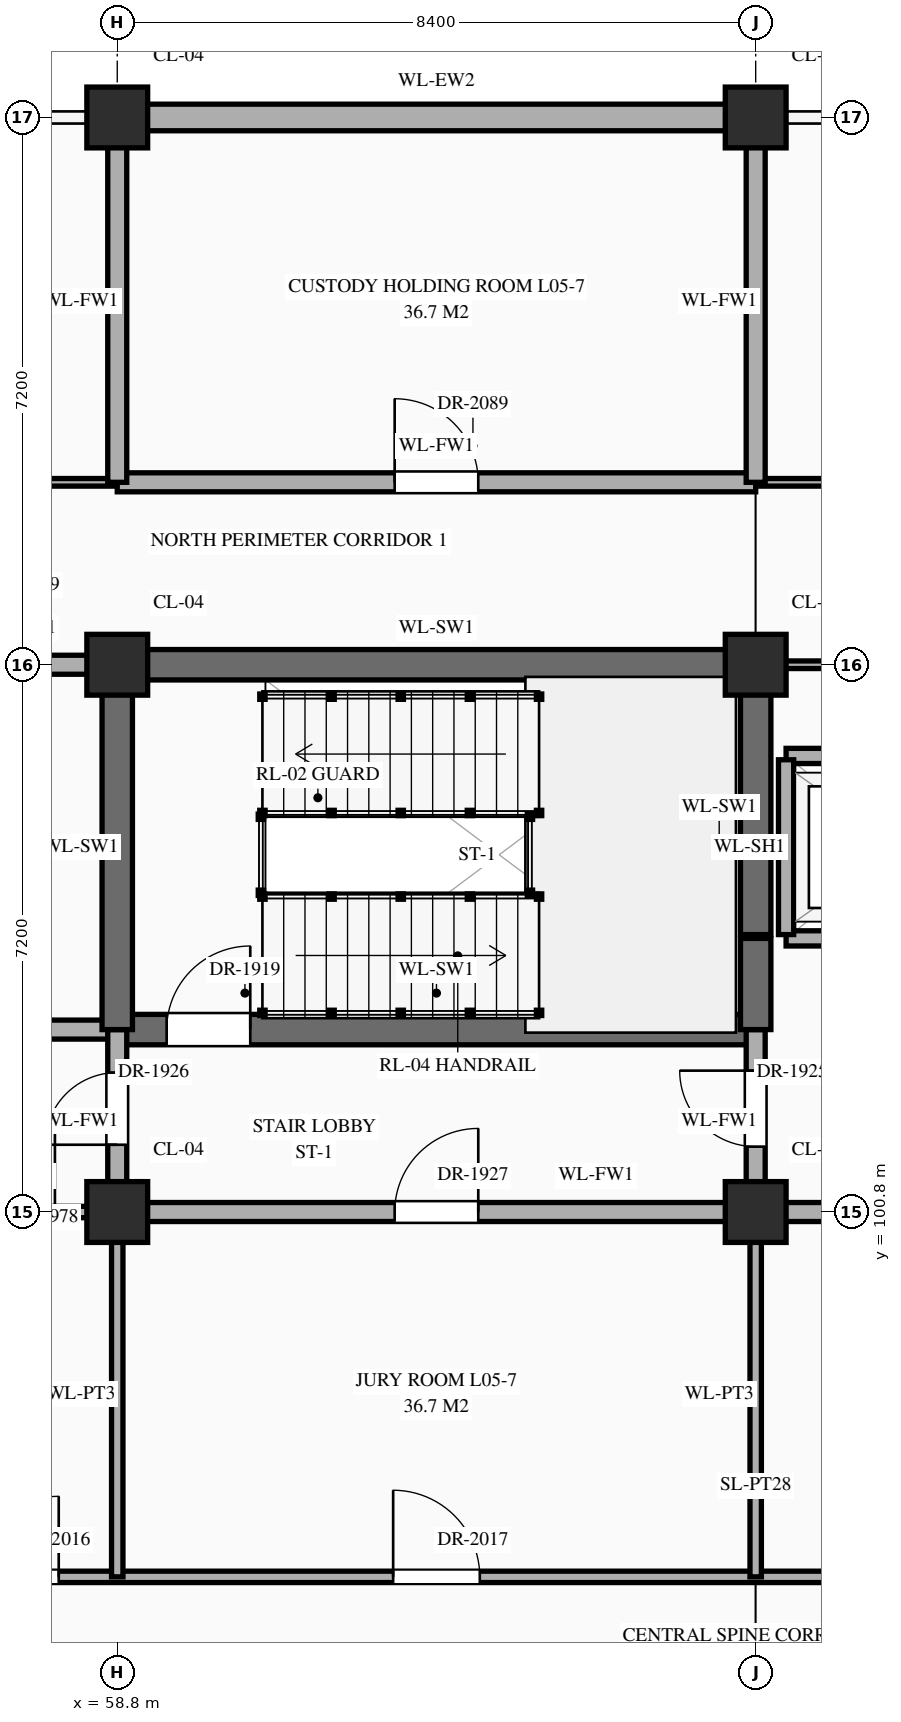
"""IFC4 building model, lengths in metres.
Left out: names, types, materials, properties, quantities, classifications, styles, units other than length and angle.
Written with IfcOpenShell. Run it as: python <this file> out.ifc"""

import sys

from ifc_helpers import new_model, si_unit, direction, frame, frame_2d, origin, origin_2d, place, context, subcontext, project, spatial, rectangle, extrude, element, fill, save


model = new_model("IFC4")
c1 = context("Model", 3, precision=1e-05, world=origin(), true_north=direction((0.0, 1.0)))
c2 = subcontext(c1, "Body", "Model", "MODEL_VIEW")
j1 = project(units=[si_unit("LENGTHUNIT", "METRE"), si_unit("PLANEANGLEUNIT", "RADIAN")], contexts=[c1])
p1 = place(None, origin())
s1 = spatial("IfcSite", under=j1, at=p1, CompositionType="ELEMENT")
p2 = place(p1, origin())
s2 = spatial("IfcBuilding", under=s1, at=p2, CompositionType="ELEMENT")
p3 = place(p2, frame((0.0, 0.0, 21.6)))
s3 = spatial("IfcBuildingStorey", under=s2, at=p3, CompositionType="ELEMENT", Elevation=21.6)
for number, where, z_axis, x_axis in (
    (1, (58.8, 100.8, 0.0), (0.0, 0.0, 1.0), (1.0, 0.0, 0.0)),
    (2, (58.8, 108.0, 0.0), (0.0, 0.0, 1.0), (1.0, 0.0, 0.0)),
    (3, (58.8, 115.2, 0.0), (0.0, 0.0, 1.0), (1.0, 0.0, 0.0)),
    (4, (67.2, 100.8, 0.0), (0.0, 0.0, 1.0), (1.0, 0.0, 0.0)),
    (5, (67.2, 108.0, 0.0), (0.0, 0.0, 1.0), (1.0, 0.0, 0.0)),
    (6, (67.2, 115.2, 0.0), (0.0, 0.0, 1.0), (1.0, 0.0, 0.0)),
):
    element("IfcColumn", number, at=place(p3, frame(where, z_axis=z_axis, x_axis=x_axis)), inside=s3, PredefinedType="COLUMN", context=c2, shape_type="SweptSolid", body=[
        extrude(rectangle(XDim=0.8, YDim=0.8, at=origin_2d()), origin(), (0.0, 0.0, 1.0), 4.5),
    ])
p4 = place(p3, frame((59.195, 115.2, 0.0), z_axis=(0.0, 0.0, 1.0), x_axis=(1.0, 0.0, 0.0)))
e7 = element("IfcWall", 7, at=p4, inside=s3, PredefinedType="STANDARD", context=c2, shape_type="SweptSolid", body=[
    extrude(rectangle(XDim=7.61, YDim=0.35, at=frame_2d((3.805, 0.0))), origin(), (0.0, 0.0, 1.0), 3.59),
])
p5 = place(p3, frame((56.2, 96.0, 0.0), z_axis=(0.0, 0.0, 1.0), x_axis=(1.0, 0.0, 0.0)))
e8 = element("IfcWall", 8, at=p5, inside=s3, PredefinedType="STANDARD", context=c2, shape_type="SweptSolid", body=[
    extrude(rectangle(XDim=27.8, YDim=0.15, at=frame_2d((13.9, 0.0))), origin(), (0.0, 0.0, 1.0), 4.24),
])
p6 = place(p5, frame((0.77, 0.0, 0.0)))
e9 = element("IfcOpeningElement", 9, at=p6, cuts=e8, PredefinedType="OPENING", context=c2, shape_type="SweptSolid", body=[
    extrude(rectangle(XDim=1.06, YDim=2.4, at=frame_2d((0.53, 1.2))), frame((0.0, 0.087, 0.0), z_axis=(0.0, -1.0, 0.0), x_axis=(1.0, 0.0, 0.0)), (0.0, 0.0, 1.0), 0.174),
])
p7 = place(p5, frame((6.23, 0.0, 0.0)))
e10 = element("IfcOpeningElement", 10, at=p7, cuts=e8, PredefinedType="OPENING", context=c2, shape_type="SweptSolid", body=[
    extrude(rectangle(XDim=1.14, YDim=2.4, at=frame_2d((0.57, 1.2))), frame((0.0, 0.087, 0.0), z_axis=(0.0, -1.0, 0.0), x_axis=(1.0, 0.0, 0.0)), (0.0, 0.0, 1.0), 0.174),
])
p8 = place(p5, frame((14.75, 0.0, 0.0)))
e11 = element("IfcOpeningElement", 11, at=p8, cuts=e8, PredefinedType="OPENING", context=c2, shape_type="SweptSolid", body=[
    extrude(rectangle(XDim=0.9, YDim=2.15, at=frame_2d((0.45, 1.075))), frame((0.0, 0.087, 0.0), z_axis=(0.0, -1.0, 0.0), x_axis=(1.0, 0.0, 0.0)), (0.0, 0.0, 1.0), 0.174),
])
p9 = place(p5, frame((23.17, 0.0, 0.0)))
e12 = element("IfcOpeningElement", 12, at=p9, cuts=e8, PredefinedType="OPENING", context=c2, shape_type="SweptSolid", body=[
    extrude(rectangle(XDim=0.86, YDim=2.1, at=frame_2d((0.43, 1.05))), frame((0.0, 0.087, 0.0), z_axis=(0.0, -1.0, 0.0), x_axis=(1.0, 0.0, 0.0)), (0.0, 0.0, 1.0), 0.174),
])
p10 = place(p3, frame((56.2, 100.8, 0.0), z_axis=(0.0, 0.0, 1.0), x_axis=(1.0, 0.0, 0.0)))
e13 = element("IfcWall", 13, at=p10, inside=s3, PredefinedType="STANDARD", context=c2, shape_type="SweptSolid", body=[
    extrude(rectangle(XDim=2.6, YDim=0.15, at=frame_2d((1.3, 0.0))), origin(), (0.0, 0.0, 1.0), 3.39),
])
p11 = place(p10, frame((0.5, 0.0, 0.0)))
e14 = element("IfcOpeningElement", 14, at=p11, cuts=e13, PredefinedType="OPENING", context=c2, shape_type="SweptSolid", body=[
    extrude(rectangle(XDim=1.28, YDim=2.35, at=frame_2d((0.64, 1.175))), frame((0.0, 0.087, 0.0), z_axis=(0.0, -1.0, 0.0), x_axis=(1.0, 0.0, 0.0)), (0.0, 0.0, 1.0), 0.174),
])
p12 = place(p3, frame((58.8, 100.8, 0.0), z_axis=(0.0, 0.0, 1.0), x_axis=(1.0, 0.0, 0.0)))
e15 = element("IfcWall", 15, at=p12, inside=s3, PredefinedType="STANDARD", context=c2, shape_type="SweptSolid", body=[
    extrude(rectangle(XDim=12.6, YDim=0.25, at=frame_2d((6.3, 0.0))), origin(), (0.0, 0.0, 1.0), 3.39),
])
p13 = place(p12, frame((3.65, 0.0, 0.0)))
e16 = element("IfcOpeningElement", 16, at=p13, cuts=e15, PredefinedType="OPENING", context=c2, shape_type="SweptSolid", body=[
    extrude(rectangle(XDim=1.1, YDim=2.2, at=frame_2d((0.55, 1.1))), frame((0.0, 0.137, 0.0), z_axis=(0.0, -1.0, 0.0), x_axis=(1.0, 0.0, 0.0)), (0.0, 0.0, 1.0), 0.274),
])
p14 = place(p3, frame((54.6, 103.2, 0.0), z_axis=(0.0, 0.0, 1.0), x_axis=(1.0, 0.0, 0.0)))
e17 = element("IfcWall", 17, at=p14, inside=s3, PredefinedType="STANDARD", context=c2, shape_type="SweptSolid", body=[
    extrude(rectangle(XDim=4.2, YDim=0.25, at=frame_2d((2.1, 0.0))), origin(), (0.0, 0.0, 1.0), 4.24),
])
p15 = place(p14, frame((1.6, 0.0, 0.0)))
e18 = element("IfcOpeningElement", 18, at=p15, cuts=e17, PredefinedType="OPENING", context=c2, shape_type="SweptSolid", body=[
    extrude(rectangle(XDim=1.0, YDim=2.2, at=frame_2d((0.5, 1.1))), frame((0.0, 0.137, 0.0), z_axis=(0.0, -1.0, 0.0), x_axis=(1.0, 0.0, 0.0)), (0.0, 0.0, 1.0), 0.274),
])
p16 = place(p3, frame((58.8, 103.2, 0.0), z_axis=(0.0, 0.0, 1.0), x_axis=(1.0, 0.0, 0.0)))
e19 = element("IfcWall", 19, at=p16, inside=s3, PredefinedType="SHEAR", context=c2, shape_type="SweptSolid", body=[
    extrude(rectangle(XDim=8.4, YDim=0.4, at=frame_2d((4.2, 0.0))), origin(), (0.0, 0.0, 1.0), 4.24),
])
p17 = place(p16, frame((0.65, 0.0, 0.0)))
e20 = element("IfcOpeningElement", 20, at=p17, cuts=e19, PredefinedType="OPENING", context=c2, shape_type="SweptSolid", body=[
    extrude(rectangle(XDim=1.1, YDim=2.2, at=frame_2d((0.55, 1.1))), frame((0.0, 0.212, 0.0), z_axis=(0.0, -1.0, 0.0), x_axis=(1.0, 0.0, 0.0)), (0.0, 0.0, 1.0), 0.424),
])
p18 = place(p3, frame((67.6, 104.4, 0.0), z_axis=(0.0, 0.0, 1.0), x_axis=(1.0, 0.0, 0.0)))
e21 = element("IfcWall", 21, at=p18, inside=s3, PredefinedType="STANDARD", context=c2, shape_type="SweptSolid", body=[
    extrude(rectangle(XDim=3.0, YDim=0.2, at=frame_2d((1.5, 0.0))), origin(), (0.0, 0.0, 1.0), 4.24),
])
p19 = place(p18, frame((0.9, 0.0, 0.0)))
e22 = element("IfcOpeningElement", 22, at=p19, cuts=e21, PredefinedType="OPENING", context=c2, shape_type="SweptSolid", body=[
    extrude(rectangle(XDim=1.2, YDim=2.15, at=frame_2d((0.6, 1.075))), frame((0.0, 0.112, 0.0), z_axis=(0.0, -1.0, 0.0), x_axis=(1.0, 0.0, 0.0)), (0.0, 0.0, 1.0), 0.224),
])
p20 = place(p3, frame((67.6, 106.8, 0.0), z_axis=(0.0, 0.0, 1.0), x_axis=(1.0, 0.0, 0.0)))
e23 = element("IfcWall", 23, at=p20, inside=s3, PredefinedType="STANDARD", context=c2, shape_type="SweptSolid", body=[
    extrude(rectangle(XDim=3.0, YDim=0.2, at=frame_2d((1.5, 0.0))), origin(), (0.0, 0.0, 1.0), 4.24),
])
p21 = place(p3, frame((54.6, 108.0, 0.0), z_axis=(0.0, 0.0, 1.0), x_axis=(1.0, 0.0, 0.0)))
e24 = element("IfcWall", 24, at=p21, inside=s3, PredefinedType="STANDARD", context=c2, shape_type="SweptSolid", body=[
    extrude(rectangle(XDim=4.2, YDim=0.25, at=frame_2d((2.1, 0.0))), origin(), (0.0, 0.0, 1.0), 3.39),
])
p22 = place(p21, frame((1.44, 0.0, 0.0)))
e25 = element("IfcOpeningElement", 25, at=p22, cuts=e24, PredefinedType="OPENING", context=c2, shape_type="SweptSolid", body=[
    extrude(rectangle(XDim=1.0, YDim=2.2, at=frame_2d((0.5, 1.1))), frame((0.0, 0.137, 0.0), z_axis=(0.0, -1.0, 0.0), x_axis=(1.0, 0.0, 0.0)), (0.0, 0.0, 1.0), 0.274),
])
p23 = place(p3, frame((58.8, 108.0, 0.0), z_axis=(0.0, 0.0, 1.0), x_axis=(1.0, 0.0, 0.0)))
e26 = element("IfcWall", 26, at=p23, inside=s3, PredefinedType="SHEAR", context=c2, shape_type="SweptSolid", body=[
    extrude(rectangle(XDim=8.4, YDim=0.4, at=frame_2d((4.2, 0.0))), origin(), (0.0, 0.0, 1.0), 4.24),
])
p24 = place(p3, frame((67.25, 108.0, 0.0), z_axis=(0.0, 0.0, 1.0), x_axis=(1.0, 0.0, 0.0)))
e27 = element("IfcWall", 27, at=p24, inside=s3, PredefinedType="STANDARD", context=c2, shape_type="SweptSolid", body=[
    extrude(rectangle(XDim=4.1, YDim=0.1, at=frame_2d((2.05, 0.0))), origin(), (0.0, 0.0, 1.0), 3.39),
])
p25 = place(p3, frame((50.44, 110.4, 0.0), z_axis=(0.0, 0.0, 1.0), x_axis=(1.0, 0.0, 0.0)))
e28 = element("IfcWall", 28, at=p25, inside=s3, PredefinedType="STANDARD", context=c2, shape_type="SweptSolid", body=[
    extrude(rectangle(XDim=8.36, YDim=0.1, at=frame_2d((4.18, 0.0))), origin(), (0.0, 0.0, 1.0), 4.24),
])
p26 = place(p25, frame((3.72, 0.0, 0.0)))
e29 = element("IfcOpeningElement", 29, at=p26, cuts=e28, PredefinedType="OPENING", context=c2, shape_type="SweptSolid", body=[
    extrude(rectangle(XDim=0.92, YDim=2.15, at=frame_2d((0.46, 1.075))), frame((0.0, 0.062, 0.0), z_axis=(0.0, -1.0, 0.0), x_axis=(1.0, 0.0, 0.0)), (0.0, 0.0, 1.0), 0.124),
])
p27 = place(p3, frame((58.8, 110.4, 0.0), z_axis=(0.0, 0.0, 1.0), x_axis=(1.0, 0.0, 0.0)))
e30 = element("IfcWall", 30, at=p27, inside=s3, PredefinedType="STANDARD", context=c2, shape_type="SweptSolid", body=[
    extrude(rectangle(XDim=8.4, YDim=0.25, at=frame_2d((4.2, 0.0))), origin(), (0.0, 0.0, 1.0), 4.24),
])
p28 = place(p27, frame((3.65, 0.0, 0.0)))
e31 = element("IfcOpeningElement", 31, at=p28, cuts=e30, PredefinedType="OPENING", context=c2, shape_type="SweptSolid", body=[
    extrude(rectangle(XDim=1.1, YDim=2.2, at=frame_2d((0.55, 1.1))), frame((0.0, 0.137, 0.0), z_axis=(0.0, -1.0, 0.0), x_axis=(1.0, 0.0, 0.0)), (0.0, 0.0, 1.0), 0.274),
])
p29 = place(p3, frame((67.2, 110.4, 0.0), z_axis=(0.0, 0.0, 1.0), x_axis=(1.0, 0.0, 0.0)))
e32 = element("IfcWall", 32, at=p29, inside=s3, PredefinedType="STANDARD", context=c2, shape_type="SweptSolid", body=[
    extrude(rectangle(XDim=33.6, YDim=0.1, at=frame_2d((16.8, 0.0))), origin(), (0.0, 0.0, 1.0), 4.24),
])
p30 = place(p29, frame((3.7, 0.0, 0.0)))
e33 = element("IfcOpeningElement", 33, at=p30, cuts=e32, PredefinedType="OPENING", context=c2, shape_type="SweptSolid", body=[
    extrude(rectangle(XDim=1.0, YDim=2.25, at=frame_2d((0.5, 1.125))), frame((0.0, 0.062, 0.0), z_axis=(0.0, -1.0, 0.0), x_axis=(1.0, 0.0, 0.0)), (0.0, 0.0, 1.0), 0.124),
])
p31 = place(p29, frame((12.08, 0.0, 0.0)))
e34 = element("IfcOpeningElement", 34, at=p31, cuts=e32, PredefinedType="OPENING", context=c2, shape_type="SweptSolid", body=[
    extrude(rectangle(XDim=1.04, YDim=2.2, at=frame_2d((0.52, 1.1))), frame((0.0, 0.062, 0.0), z_axis=(0.0, -1.0, 0.0), x_axis=(1.0, 0.0, 0.0)), (0.0, 0.0, 1.0), 0.124),
])
p32 = place(p29, frame((20.46, 0.0, 0.0)))
e35 = element("IfcOpeningElement", 35, at=p32, cuts=e32, PredefinedType="OPENING", context=c2, shape_type="SweptSolid", body=[
    extrude(rectangle(XDim=1.08, YDim=2.25, at=frame_2d((0.54, 1.125))), frame((0.0, 0.062, 0.0), z_axis=(0.0, -1.0, 0.0), x_axis=(1.0, 0.0, 0.0)), (0.0, 0.0, 1.0), 0.124),
])
p33 = place(p29, frame((28.84, 0.0, 0.0)))
e36 = element("IfcOpeningElement", 36, at=p33, cuts=e32, PredefinedType="OPENING", context=c2, shape_type="SweptSolid", body=[
    extrude(rectangle(XDim=1.12, YDim=2.25, at=frame_2d((0.56, 1.125))), frame((0.0, 0.062, 0.0), z_axis=(0.0, -1.0, 0.0), x_axis=(1.0, 0.0, 0.0)), (0.0, 0.0, 1.0), 0.124),
])
p34 = place(p3, frame((58.8, 96.0, 0.0), z_axis=(0.0, 0.0, 1.0), x_axis=(0.0, 1.0, 0.0)))
e37 = element("IfcWall", 37, at=p34, inside=s3, PredefinedType="STANDARD", context=c2, shape_type="SweptSolid", body=[
    extrude(rectangle(XDim=4.8, YDim=0.15, at=frame_2d((2.4, 0.0))), origin(), (0.0, 0.0, 1.0), 3.49),
])
p35 = place(p3, frame((58.8, 100.8, 0.0), z_axis=(0.0, 0.0, 1.0), x_axis=(0.0, 1.0, 0.0)))
e38 = element("IfcWall", 38, at=p35, inside=s3, PredefinedType="STANDARD", context=c2, shape_type="SweptSolid", body=[
    extrude(rectangle(XDim=2.4, YDim=0.25, at=frame_2d((1.2, 0.0))), origin(), (0.0, 0.0, 1.0), 3.49),
])
p36 = place(p35, frame((0.885, 0.0, 0.0)))
e39 = element("IfcOpeningElement", 39, at=p36, cuts=e38, PredefinedType="OPENING", context=c2, shape_type="SweptSolid", body=[
    extrude(rectangle(XDim=0.95, YDim=2.15, at=frame_2d((0.475, 1.075))), frame((0.0, 0.137, 0.0), z_axis=(0.0, -1.0, 0.0), x_axis=(1.0, 0.0, 0.0)), (0.0, 0.0, 1.0), 0.274),
])
p37 = place(p3, frame((58.8, 103.2, 0.0), z_axis=(0.0, 0.0, 1.0), x_axis=(0.0, 1.0, 0.0)))
e40 = element("IfcWall", 40, at=p37, inside=s3, PredefinedType="SHEAR", context=c2, shape_type="SweptSolid", body=[
    extrude(rectangle(XDim=4.8, YDim=0.4, at=frame_2d((2.4, 0.0))), origin(), (0.0, 0.0, 1.0), 4.24),
])
p38 = place(p3, frame((58.8, 110.4, 0.0), z_axis=(0.0, 0.0, 1.0), x_axis=(0.0, 1.0, 0.0)))
e41 = element("IfcWall", 41, at=p38, inside=s3, PredefinedType="STANDARD", context=c2, shape_type="SweptSolid", body=[
    extrude(rectangle(XDim=4.76, YDim=0.25, at=frame_2d((2.38, 0.0))), origin(), (0.0, 0.0, 1.0), 3.49),
])
p39 = place(p3, frame((67.2, 96.0, 0.0), z_axis=(0.0, 0.0, 1.0), x_axis=(0.0, 1.0, 0.0)))
e42 = element("IfcWall", 42, at=p39, inside=s3, PredefinedType="STANDARD", context=c2, shape_type="SweptSolid", body=[
    extrude(rectangle(XDim=4.8, YDim=0.15, at=frame_2d((2.4, 0.0))), origin(), (0.0, 0.0, 1.0), 3.49),
])
p40 = place(p3, frame((67.2, 100.8, 0.0), z_axis=(0.0, 0.0, 1.0), x_axis=(0.0, 1.0, 0.0)))
e43 = element("IfcWall", 43, at=p40, inside=s3, PredefinedType="STANDARD", context=c2, shape_type="SweptSolid", body=[
    extrude(rectangle(XDim=2.4, YDim=0.25, at=frame_2d((1.2, 0.0))), origin(), (0.0, 0.0, 1.0), 3.49),
])
p41 = place(p40, frame((0.86, 0.0, 0.0)))
e44 = element("IfcOpeningElement", 44, at=p41, cuts=e43, PredefinedType="OPENING", context=c2, shape_type="SweptSolid", body=[
    extrude(rectangle(XDim=1.0, YDim=2.2, at=frame_2d((0.5, 1.1))), frame((0.0, 0.137, 0.0), z_axis=(0.0, -1.0, 0.0), x_axis=(1.0, 0.0, 0.0)), (0.0, 0.0, 1.0), 0.274),
])
p42 = place(p3, frame((67.2, 103.2, 0.0), z_axis=(0.0, 0.0, 1.0), x_axis=(0.0, 1.0, 0.0)))
e45 = element("IfcWall", 45, at=p42, inside=s3, PredefinedType="SHEAR", context=c2, shape_type="SweptSolid", body=[
    extrude(rectangle(XDim=1.2, YDim=0.4, at=frame_2d((0.6, 0.0))), origin(), (0.0, 0.0, 1.0), 4.24),
])
p43 = place(p3, frame((67.2, 104.45, 0.0), z_axis=(0.0, 0.0, 1.0), x_axis=(0.0, 1.0, 0.0)))
e46 = element("IfcWall", 46, at=p43, inside=s3, PredefinedType="SHEAR", context=c2, shape_type="SweptSolid", body=[
    extrude(rectangle(XDim=3.5, YDim=0.4, at=frame_2d((1.75, 0.0))), origin(), (0.0, 0.0, 1.0), 4.24),
])
p44 = place(p3, frame((67.2, 110.4, 0.0), z_axis=(0.0, 0.0, 1.0), x_axis=(0.0, 1.0, 0.0)))
e47 = element("IfcWall", 47, at=p44, inside=s3, PredefinedType="STANDARD", context=c2, shape_type="SweptSolid", body=[
    extrude(rectangle(XDim=4.76, YDim=0.25, at=frame_2d((2.38, 0.0))), origin(), (0.0, 0.0, 1.0), 3.49),
])
p45 = place(p3, frame((67.6, 104.45, 0.0), z_axis=(0.0, 0.0, 1.0), x_axis=(0.0, 1.0, 0.0)))
e48 = element("IfcWall", 48, at=p45, inside=s3, PredefinedType="STANDARD", context=c2, shape_type="SweptSolid", body=[
    extrude(rectangle(XDim=2.3, YDim=0.2, at=frame_2d((1.15, 0.0))), origin(), (0.0, 0.0, 1.0), 4.24),
])
p46 = place(p17, origin())
e49 = element("IfcDoor", 49, at=p46, inside=s3, OperationType="SINGLE_SWING_RIGHT", PredefinedType="DOOR", context=c2, shape_type="SweptSolid", body=[
    extrude(rectangle(XDim=1.1, YDim=2.2, at=frame_2d((0.55, 1.1))), frame((0.0, 0.025, 0.0), z_axis=(0.0, -1.0, 0.0), x_axis=(1.0, 0.0, 0.0)), (0.0, 0.0, 1.0), 0.05),
])
fill(e20, e49)
p47 = place(p41, origin())
e50 = element("IfcDoor", 50, at=p47, inside=s3, OperationType="SINGLE_SWING_RIGHT", PredefinedType="DOOR", context=c2, shape_type="SweptSolid", body=[
    extrude(rectangle(XDim=1.0, YDim=2.2, at=frame_2d((0.5, 1.1))), frame((0.0, 0.025, 0.0), z_axis=(0.0, -1.0, 0.0), x_axis=(1.0, 0.0, 0.0)), (0.0, 0.0, 1.0), 0.05),
])
fill(e44, e50)
p48 = place(p36, origin())
e51 = element("IfcDoor", 51, at=p48, inside=s3, OperationType="SINGLE_SWING_LEFT", PredefinedType="DOOR", context=c2, shape_type="SweptSolid", body=[
    extrude(rectangle(XDim=0.95, YDim=2.15, at=frame_2d((0.475, 1.075))), frame((0.0, 0.025, 0.0), z_axis=(0.0, -1.0, 0.0), x_axis=(1.0, 0.0, 0.0)), (0.0, 0.0, 1.0), 0.05),
])
fill(e39, e51)
p49 = place(p13, origin())
e52 = element("IfcDoor", 52, at=p49, inside=s3, OperationType="SINGLE_SWING_RIGHT", PredefinedType="DOOR", context=c2, shape_type="SweptSolid", body=[
    extrude(rectangle(XDim=1.1, YDim=2.2, at=frame_2d((0.55, 1.1))), frame((0.0, 0.025, 0.0), z_axis=(0.0, -1.0, 0.0), x_axis=(1.0, 0.0, 0.0)), (0.0, 0.0, 1.0), 0.05),
])
fill(e16, e52)
p50 = place(p11, origin())
e53 = element("IfcDoor", 53, at=p50, inside=s3, OperationType="SINGLE_SWING_RIGHT", PredefinedType="DOOR", context=c2, shape_type="SweptSolid", body=[
    extrude(rectangle(XDim=1.28, YDim=2.35, at=frame_2d((0.64, 1.175))), frame((0.0, 0.025, 0.0), z_axis=(0.0, -1.0, 0.0), x_axis=(1.0, 0.0, 0.0)), (0.0, 0.0, 1.0), 0.05),
])
fill(e14, e53)
p51 = place(p6, origin())
e54 = element("IfcDoor", 54, at=p51, inside=s3, OperationType="SINGLE_SWING_RIGHT", PredefinedType="DOOR", context=c2, shape_type="SweptSolid", body=[
    extrude(rectangle(XDim=1.06, YDim=2.4, at=frame_2d((0.53, 1.2))), frame((0.0, 0.025, 0.0), z_axis=(0.0, -1.0, 0.0), x_axis=(1.0, 0.0, 0.0)), (0.0, 0.0, 1.0), 0.05),
])
fill(e9, e54)
p52 = place(p7, origin())
e55 = element("IfcDoor", 55, at=p52, inside=s3, OperationType="SINGLE_SWING_LEFT", PredefinedType="DOOR", context=c2, shape_type="SweptSolid", body=[
    extrude(rectangle(XDim=1.14, YDim=2.4, at=frame_2d((0.57, 1.2))), frame((0.0, 0.025, 0.0), z_axis=(0.0, -1.0, 0.0), x_axis=(1.0, 0.0, 0.0)), (0.0, 0.0, 1.0), 0.05),
])
fill(e10, e55)
p53 = place(p28, origin())
e56 = element("IfcDoor", 56, at=p53, inside=s3, OperationType="SINGLE_SWING_LEFT", PredefinedType="DOOR", context=c2, shape_type="SweptSolid", body=[
    extrude(rectangle(XDim=1.1, YDim=2.2, at=frame_2d((0.55, 1.1))), frame((0.0, 0.025, 0.0), z_axis=(0.0, -1.0, 0.0), x_axis=(1.0, 0.0, 0.0)), (0.0, 0.0, 1.0), 0.05),
])
fill(e31, e56)
save(model, sys.argv[1])
